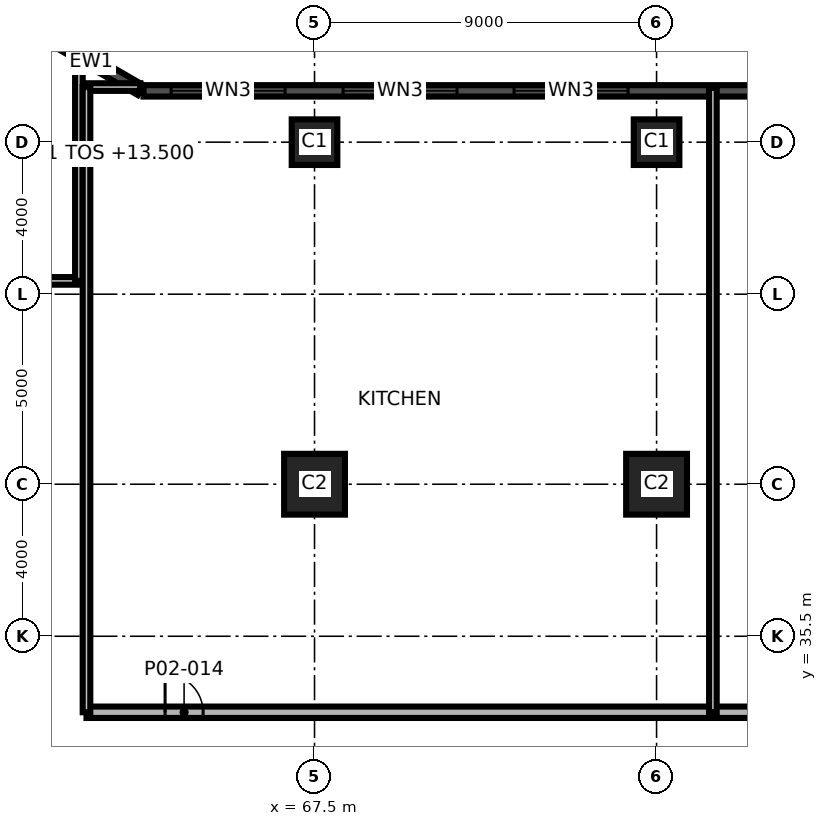
"""IFC4 building model, lengths in metres.
Left out: names, types, materials, properties, quantities, classifications, styles, units other than length and angle.
Written with IfcOpenShell. Run it as: python <this file> out.ifc"""

import sys

from ifc_helpers import new_model, si_unit, direction, frame, frame_2d, origin, origin_2d, place, context, subcontext, project, spatial, rectangle, extrude, element, fill, save


model = new_model("IFC4")
c1 = context("Model", 3, precision=1e-05, world=origin(), true_north=direction((0.0, 1.0)))
c2 = subcontext(c1, "Body", "Model", "MODEL_VIEW")
j1 = project(units=[si_unit("LENGTHUNIT", "METRE"), si_unit("PLANEANGLEUNIT", "RADIAN")], contexts=[c1])
p1 = place(None, origin())
s1 = spatial("IfcSite", under=j1, at=p1, CompositionType="ELEMENT")
p2 = place(p1, origin())
s2 = spatial("IfcBuilding", under=s1, at=p2, CompositionType="ELEMENT")
p3 = place(p2, frame((0.0, 0.0, 13.5)))
s3 = spatial("IfcBuildingStorey", under=s2, at=p3, CompositionType="ELEMENT", Elevation=13.5)
for number, where, z_axis, x_axis in (
    (1, (67.5, 39.5, 0.0), (0.0, 0.0, 1.0), (1.0, 0.0, 0.0)),
    (2, (76.5, 39.5, 0.0), (0.0, 0.0, 1.0), (1.0, 0.0, 0.0)),
):
    element("IfcColumn", number, at=place(p3, frame(where, z_axis=z_axis, x_axis=x_axis)), inside=s3, PredefinedType="COLUMN", context=c2, shape_type="SweptSolid", body=[
        extrude(rectangle(XDim=1.6, YDim=1.6, at=origin_2d()), origin(), (0.0, 0.0, 1.0), 5.0),
    ])
for number, where, z_axis, x_axis in (
    (3, (67.5, 48.5, 0.0), (0.0, 0.0, 1.0), (1.0, 0.0, 0.0)),
    (4, (76.5, 48.5, 0.0), (0.0, 0.0, 1.0), (1.0, 0.0, 0.0)),
):
    element("IfcColumn", number, at=place(p3, frame(where, z_axis=z_axis, x_axis=x_axis)), inside=s3, PredefinedType="COLUMN", context=c2, shape_type="SweptSolid", body=[
        extrude(rectangle(XDim=1.2, YDim=1.2, at=origin_2d()), origin(), (0.0, 0.0, 1.0), 5.0),
    ])
p4 = place(p3, frame((98.952, 49.85, 0.0), z_axis=(0.0, 0.0, 1.0), x_axis=(-1.0, 0.0, 0.0)))
e5 = element("IfcWall", 5, at=p4, inside=s3, PredefinedType="SOLIDWALL", context=c2, shape_type="SweptSolid", body=[
    extrude(rectangle(XDim=35.952, YDim=0.3, at=frame_2d((17.976, 0.0))), origin(), (0.0, 0.0, 1.0), 4.7),
])
p5 = place(p4, frame((9.702, 0.0, 0.9)))
e6 = element("IfcOpeningElement", 6, at=p5, cuts=e5, PredefinedType="OPENING", context=c2, shape_type="SweptSolid", body=[
    extrude(rectangle(XDim=3.0, YDim=2.4, at=frame_2d((1.5, 1.2))), frame((0.0, 0.16, 0.0), z_axis=(0.0, -1.0, 0.0), x_axis=(1.0, 0.0, 0.0)), (0.0, 0.0, 1.0), 0.32),
])
p6 = place(p4, frame((14.202, 0.0, 0.9)))
e7 = element("IfcOpeningElement", 7, at=p6, cuts=e5, PredefinedType="OPENING", context=c2, shape_type="SweptSolid", body=[
    extrude(rectangle(XDim=3.0, YDim=2.4, at=frame_2d((1.5, 1.2))), frame((0.0, 0.16, 0.0), z_axis=(0.0, -1.0, 0.0), x_axis=(1.0, 0.0, 0.0)), (0.0, 0.0, 1.0), 0.32),
])
p7 = place(p4, frame((23.202, 0.0, 0.9)))
e8 = element("IfcOpeningElement", 8, at=p7, cuts=e5, PredefinedType="OPENING", context=c2, shape_type="SweptSolid", body=[
    extrude(rectangle(XDim=3.0, YDim=2.4, at=frame_2d((1.5, 1.2))), frame((0.0, 0.16, 0.0), z_axis=(0.0, -1.0, 0.0), x_axis=(1.0, 0.0, 0.0)), (0.0, 0.0, 1.0), 0.32),
])
p8 = place(p4, frame((27.702, 0.0, 0.9)))
e9 = element("IfcOpeningElement", 9, at=p8, cuts=e5, PredefinedType="OPENING", context=c2, shape_type="SweptSolid", body=[
    extrude(rectangle(XDim=3.0, YDim=2.4, at=frame_2d((1.5, 1.2))), frame((0.0, 0.16, 0.0), z_axis=(0.0, -1.0, 0.0), x_axis=(1.0, 0.0, 0.0)), (0.0, 0.0, 1.0), 0.32),
])
p9 = place(p4, frame((32.226, 0.0, 0.9)))
e10 = element("IfcOpeningElement", 10, at=p9, cuts=e5, PredefinedType="OPENING", context=c2, shape_type="SweptSolid", body=[
    extrude(rectangle(XDim=3.0, YDim=2.4, at=frame_2d((1.5, 1.2))), frame((0.0, 0.16, 0.0), z_axis=(0.0, -1.0, 0.0), x_axis=(1.0, 0.0, 0.0)), (0.0, 0.0, 1.0), 0.32),
])
p10 = place(p3, frame((62.925, 49.87, 0.0), z_axis=(0.0, 0.0, 1.0), x_axis=(-0.866031096941, 0.499990139034, 0.0)))
e11 = element("IfcWall", 11, at=p10, inside=s3, PredefinedType="SOLIDWALL", context=c2, shape_type="SweptSolid", body=[
    extrude(rectangle(XDim=3.0, YDim=0.3, at=frame_2d((1.5, 0.0))), origin(), (0.0, 0.0, 1.0), 4.7),
])
p11 = place(p3, frame((61.5, 33.5, 0.0), z_axis=(0.0, 0.0, 1.0), x_axis=(1.0, 0.0, 0.0)))
e12 = element("IfcWall", 12, at=p11, inside=s3, PredefinedType="SHEAR", context=c2, shape_type="SweptSolid", body=[
    extrude(rectangle(XDim=43.43, YDim=0.3, at=frame_2d((21.715, 0.0))), origin(), (0.0, 0.0, 1.0), 4.7),
])
p12 = place(p11, frame((31.95, 0.0, 0.0)))
e13 = element("IfcOpeningElement", 13, at=p12, cuts=e12, PredefinedType="OPENING", context=c2, shape_type="SweptSolid", body=[
    extrude(rectangle(XDim=1.8, YDim=2.1, at=frame_2d((0.9, 1.05))), frame((0.0, 0.16, 0.0), z_axis=(0.0, -1.0, 0.0), x_axis=(1.0, 0.0, 0.0)), (0.0, 0.0, 1.0), 0.32),
])
p13 = place(p11, frame((2.068, 0.0, 0.0)))
e14 = element("IfcOpeningElement", 14, at=p13, cuts=e12, PredefinedType="OPENING", context=c2, shape_type="SweptSolid", body=[
    extrude(rectangle(XDim=1.0, YDim=2.1, at=frame_2d((0.5, 1.05))), frame((0.0, 0.16, 0.0), z_axis=(0.0, -1.0, 0.0), x_axis=(1.0, 0.0, 0.0)), (0.0, 0.0, 1.0), 0.32),
])
p14 = place(p11, frame((22.846, 0.0, 0.0)))
e15 = element("IfcOpeningElement", 15, at=p14, cuts=e12, PredefinedType="OPENING", context=c2, shape_type="SweptSolid", body=[
    extrude(rectangle(XDim=1.0, YDim=2.1, at=frame_2d((0.5, 1.05))), frame((0.0, 0.16, 0.0), z_axis=(0.0, -1.0, 0.0), x_axis=(1.0, 0.0, 0.0)), (0.0, 0.0, 1.0), 0.32),
])
p15 = place(p11, frame((37.945, 0.0, 0.0)))
e16 = element("IfcOpeningElement", 16, at=p15, cuts=e12, PredefinedType="OPENING", context=c2, shape_type="SweptSolid", body=[
    extrude(rectangle(XDim=1.0, YDim=2.1, at=frame_2d((0.5, 1.05))), frame((0.0, 0.16, 0.0), z_axis=(0.0, -1.0, 0.0), x_axis=(1.0, 0.0, 0.0)), (0.0, 0.0, 1.0), 0.32),
])
p16 = place(p3, frame((43.3, 44.85, 0.0), z_axis=(0.0, 0.0, 1.0), x_axis=(1.0, 0.0, 0.0)))
e17 = element("IfcWall", 17, at=p16, inside=s3, PredefinedType="PARTITIONING", context=c2, shape_type="SweptSolid", body=[
    extrude(rectangle(XDim=18.2, YDim=0.2, at=frame_2d((9.1, 0.0))), origin(), (0.0, 0.0, 1.0), 4.7),
])
p17 = place(p16, frame((3.377, 0.0, 0.0)))
e18 = element("IfcOpeningElement", 18, at=p17, cuts=e17, PredefinedType="OPENING", context=c2, shape_type="SweptSolid", body=[
    extrude(rectangle(XDim=2.2, YDim=2.4, at=frame_2d((1.1, 1.2))), frame((0.0, 0.11, 0.0), z_axis=(0.0, -1.0, 0.0), x_axis=(1.0, 0.0, 0.0)), (0.0, 0.0, 1.0), 0.22),
])
p18 = place(p3, frame((61.5, 49.95, 0.0), z_axis=(0.0, 0.0, 1.0), x_axis=(1.0, 0.0, 0.0)))
e19 = element("IfcWall", 19, at=p18, inside=s3, PredefinedType="PARTITIONING", context=c2, shape_type="SweptSolid", body=[
    extrude(rectangle(XDim=1.416, YDim=0.2, at=frame_2d((0.708, 0.0))), origin(), (0.0, 0.0, 1.0), 4.7),
])
p19 = place(p3, frame((61.3, 44.85, 0.0), z_axis=(0.0, 0.0, 1.0), x_axis=(0.0, 1.0, 0.0)))
e20 = element("IfcWall", 20, at=p19, inside=s3, PredefinedType="PARTITIONING", context=c2, shape_type="SweptSolid", body=[
    extrude(rectangle(XDim=5.742, YDim=0.2, at=frame_2d((2.871, 0.0))), origin(), (0.0, 0.0, 1.0), 4.7),
])
p20 = place(p3, frame((61.5, 33.5, 0.0), z_axis=(0.0, 0.0, 1.0), x_axis=(0.0, 1.0, 0.0)))
e21 = element("IfcWall", 21, at=p20, inside=s3, PredefinedType="PARTITIONING", context=c2, shape_type="SweptSolid", body=[
    extrude(rectangle(XDim=16.45, YDim=0.2, at=frame_2d((8.225, 0.0))), origin(), (0.0, 0.0, 1.0), 4.7),
])
p21 = place(p3, frame((77.982, 33.5, 0.0), z_axis=(0.0, 0.0, 1.0), x_axis=(0.0, 1.0, 0.0)))
e22 = element("IfcWall", 22, at=p21, inside=s3, PredefinedType="PARTITIONING", context=c2, shape_type="SweptSolid", body=[
    extrude(rectangle(XDim=16.43, YDim=0.2, at=frame_2d((8.215, 0.0))), origin(), (0.0, 0.0, 1.0), 4.7),
])
p22 = place(p7, origin())
e23 = element("IfcWindow", 23, at=p22, inside=s3, PartitioningType="SINGLE_PANEL", PredefinedType="WINDOW", context=c2, shape_type="SweptSolid", body=[
    extrude(rectangle(XDim=3.0, YDim=2.4, at=frame_2d((1.5, 1.2))), frame((0.0, 0.03, 0.0), z_axis=(0.0, -1.0, 0.0), x_axis=(1.0, 0.0, 0.0)), (0.0, 0.0, 1.0), 0.06),
])
fill(e8, e23)
p23 = place(p8, origin())
e24 = element("IfcWindow", 24, at=p23, inside=s3, PartitioningType="SINGLE_PANEL", PredefinedType="WINDOW", context=c2, shape_type="SweptSolid", body=[
    extrude(rectangle(XDim=3.0, YDim=2.4, at=frame_2d((1.5, 1.2))), frame((0.0, 0.03, 0.0), z_axis=(0.0, -1.0, 0.0), x_axis=(1.0, 0.0, 0.0)), (0.0, 0.0, 1.0), 0.06),
])
fill(e9, e24)
p24 = place(p9, origin())
e25 = element("IfcWindow", 25, at=p24, inside=s3, PartitioningType="SINGLE_PANEL", PredefinedType="WINDOW", context=c2, shape_type="SweptSolid", body=[
    extrude(rectangle(XDim=3.0, YDim=2.4, at=frame_2d((1.5, 1.2))), frame((0.0, 0.03, 0.0), z_axis=(0.0, -1.0, 0.0), x_axis=(1.0, 0.0, 0.0)), (0.0, 0.0, 1.0), 0.06),
])
fill(e10, e25)
p25 = place(p13, origin())
e26 = element("IfcDoor", 26, at=p25, inside=s3, OperationType="SINGLE_SWING_RIGHT", PredefinedType="DOOR", context=c2, shape_type="SweptSolid", body=[
    extrude(rectangle(XDim=1.0, YDim=2.1, at=frame_2d((0.5, 1.05))), frame((0.0, 0.025, 0.0), z_axis=(0.0, -1.0, 0.0), x_axis=(1.0, 0.0, 0.0)), (0.0, 0.0, 1.0), 0.05),
])
fill(e14, e26)
save(model, sys.argv[1])
